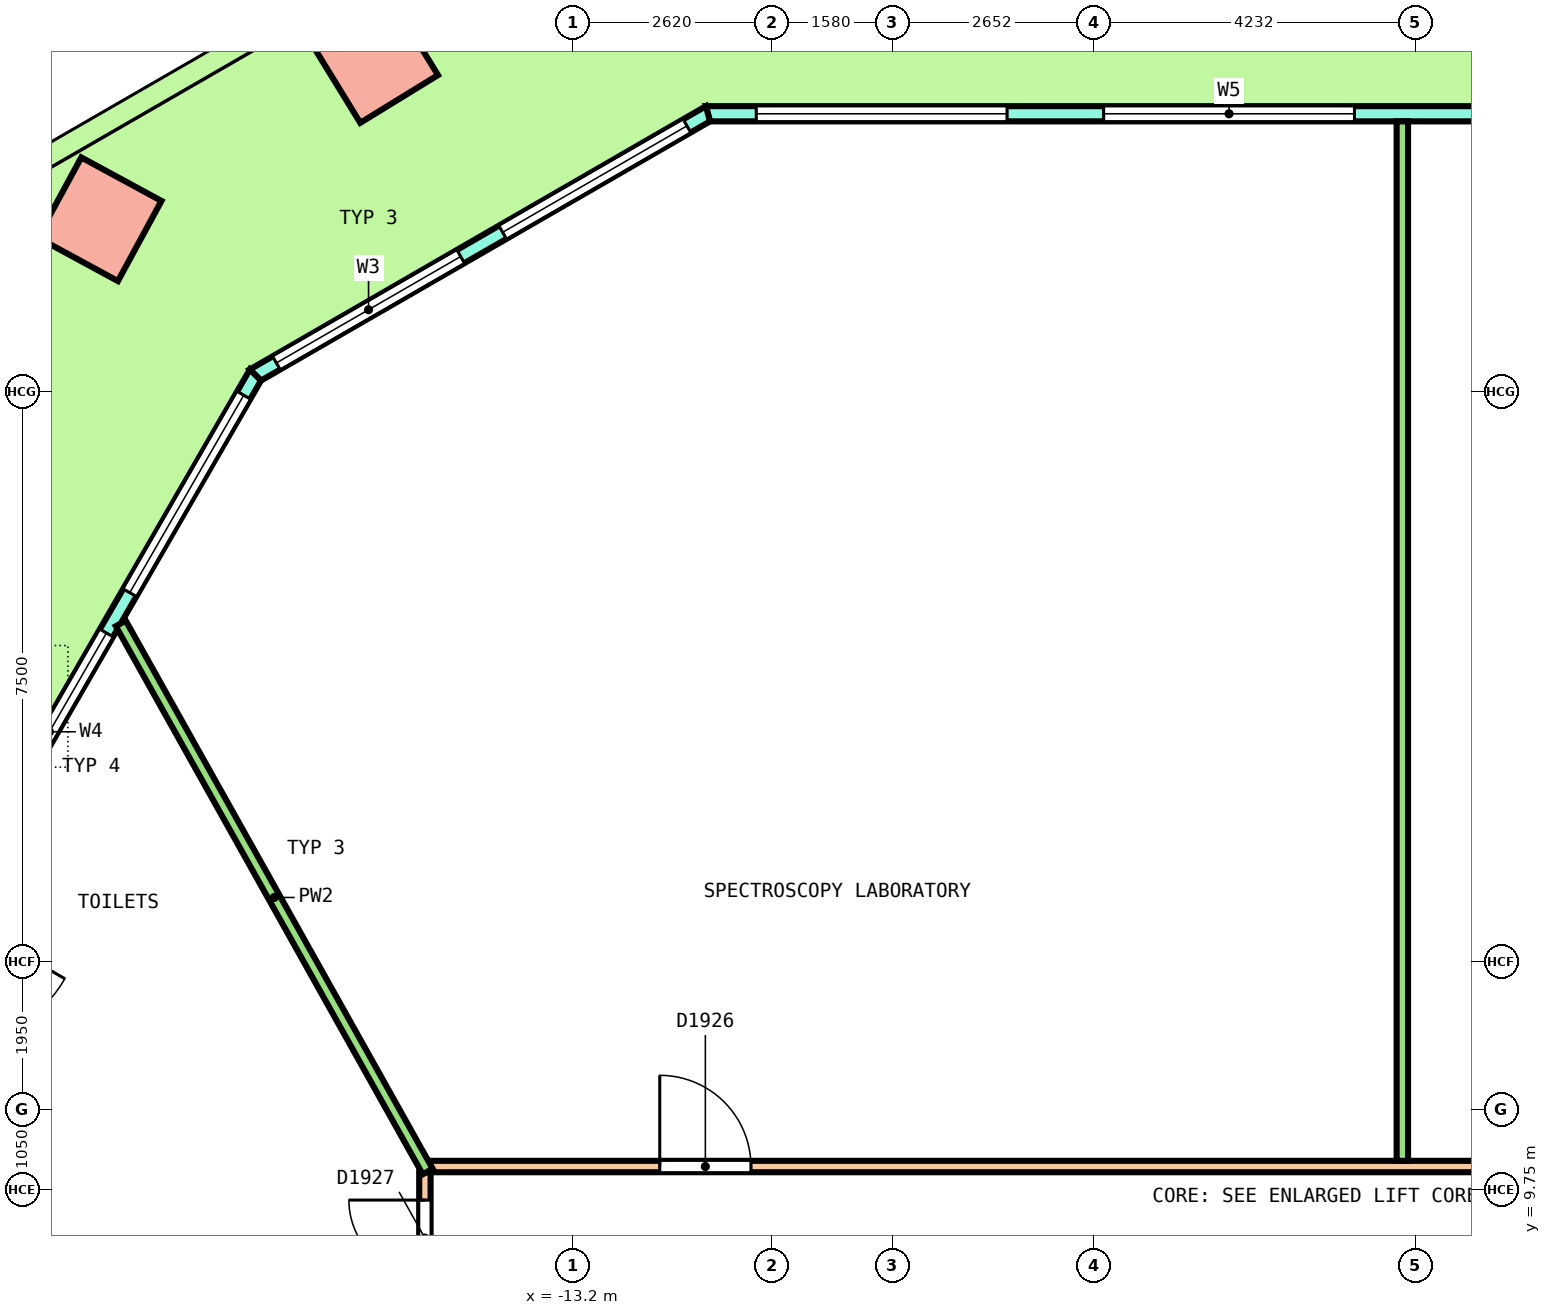
"""IFC4 building model, lengths in metres.
Left out: names, types, materials, properties, quantities, classifications, styles, units other than length and angle.
Written with IfcOpenShell. Run it as: python <this file> out.ifc"""

import sys

from ifc_helpers import new_model, si_unit, direction, frame, frame_2d, origin, origin_2d, place, context, subcontext, project, spatial, polyline, rectangle, outline, extrude, element, fill, save


model = new_model("IFC4")
c1 = context("Model", 3, precision=1e-05, world=origin(), true_north=direction((0.0, 1.0)))
c2 = subcontext(c1, "Body", "Model", "MODEL_VIEW")
j1 = project(units=[si_unit("LENGTHUNIT", "METRE"), si_unit("PLANEANGLEUNIT", "RADIAN")], contexts=[c1])
p1 = place(None, origin())
s1 = spatial("IfcSite", under=j1, at=p1, CompositionType="ELEMENT")
p2 = place(p1, origin())
s2 = spatial("IfcBuilding", under=s1, at=p2, CompositionType="ELEMENT")
p3 = place(p2, frame((0.0, 0.0, 198.0)))
s3 = spatial("IfcBuildingStorey", under=s2, at=p3, CompositionType="ELEMENT", Elevation=198.0)
for number, where, z_axis, x_axis in (
    (1, (-15.803, 24.606, 0.0), (0.341, 0.0, 0.94), (-0.801, -0.523, 0.291)),
    (2, (-19.43, 22.512, 0.0), (0.341, 0.0, 0.94), (-0.448, -0.879, 0.163)),
):
    element("IfcColumn", number, at=place(p3, frame(where, z_axis=z_axis, x_axis=x_axis)), inside=s3, PredefinedType="COLUMN", context=c2, shape_type="SweptSolid", body=[
        extrude(rectangle(XDim=1.2, YDim=1.2, at=origin_2d()), origin(), (0.0, 0.0, 1.0), 4.298),
    ])
p4 = place(p3, frame((-21.386, 19.124, 0.0), z_axis=(0.309910068217, -0.059659690135, 0.948892233602), x_axis=(-0.470578368631, -0.876836033094, 0.09856251846)))
e3 = element("IfcColumn", 3, at=p4, inside=s3, PredefinedType="COLUMN", context=c2, shape_type="SweptSolid", body=[
    extrude(rectangle(XDim=1.2, YDim=1.2, at=origin_2d()), origin(), (0.0, 0.0, 1.0), 4.268),
])
p5 = place(p3, frame((11.426, 23.9, 0.0), z_axis=(0.0, 0.0, 1.0), x_axis=(-1.0, 0.0, 0.0)))
e4 = element("IfcWall", 4, at=p5, inside=s3, PredefinedType="SOLIDWALL", context=c2, shape_type="SweptSolid", body=[
    extrude(outline(polyline([(-0.027, -0.1), (1.014, -0.1), (2.055, -0.1), (3.097, -0.1), (4.138, -0.1), (5.179, -0.1), (6.22, -0.1), (7.261, -0.1), (8.303, -0.1), (9.344, -0.1), (10.385, -0.1), (11.426, -0.1), (12.468, -0.1), (13.509, -0.1), (14.55, -0.1), (15.591, -0.1), (16.632, -0.1), (17.673, -0.1), (18.715, -0.1), (19.756, -0.1), (20.797, -0.1), (21.838, -0.1), (22.879, -0.1), (22.826, 0.1), (21.789, 0.1), (20.753, 0.1), (19.717, 0.1), (18.68, 0.1), (17.644, 0.1), (16.608, 0.1), (15.572, 0.1), (14.535, 0.1), (13.499, 0.1), (12.463, 0.1), (11.426, 0.1), (10.39, 0.1), (9.354, 0.1), (8.317, 0.1), (7.281, 0.1), (6.245, 0.1), (5.208, 0.1), (4.172, 0.1), (3.136, 0.1), (2.099, 0.1), (1.063, 0.1), (0.027, 0.1), (-0.027, -0.1)])), origin(), (0.0, 0.0, 1.0), 4.1),
])
p6 = place(p5, frame((0.635, 0.0, 0.1)))
e5 = element("IfcOpeningElement", 5, at=p6, cuts=e4, PredefinedType="OPENING", context=c2, shape_type="SweptSolid", body=[
    extrude(rectangle(XDim=3.3, YDim=2.9, at=frame_2d((1.65, 1.45))), frame((0.0, 0.11, 0.0), z_axis=(0.0, -1.0, 0.0), x_axis=(1.0, 0.0, 0.0)), (0.0, 0.0, 1.0), 0.22),
])
p7 = place(p5, frame((5.206, 0.0, 0.1)))
e6 = element("IfcOpeningElement", 6, at=p7, cuts=e4, PredefinedType="OPENING", context=c2, shape_type="SweptSolid", body=[
    extrude(rectangle(XDim=3.3, YDim=2.9, at=frame_2d((1.65, 1.45))), frame((0.0, 0.11, 0.0), z_axis=(0.0, -1.0, 0.0), x_axis=(1.0, 0.0, 0.0)), (0.0, 0.0, 1.0), 0.22),
])
p8 = place(p5, frame((10.526, 0.0, 0.0)))
e7 = element("IfcOpeningElement", 7, at=p8, cuts=e4, PredefinedType="OPENING", context=c2, shape_type="SweptSolid", body=[
    extrude(rectangle(XDim=1.8, YDim=2.4, at=frame_2d((0.9, 1.2))), frame((0.0, 0.11, 0.0), z_axis=(0.0, -1.0, 0.0), x_axis=(1.0, 0.0, 0.0)), (0.0, 0.0, 1.0), 0.22),
])
p9 = place(p5, frame((10.526, 0.0, 2.55)))
e8 = element("IfcOpeningElement", 8, at=p9, cuts=e4, PredefinedType="OPENING", context=c2, shape_type="SweptSolid", body=[
    extrude(rectangle(XDim=1.8, YDim=0.45, at=frame_2d((0.9, 0.225))), frame((0.0, 0.11, 0.0), z_axis=(0.0, -1.0, 0.0), x_axis=(1.0, 0.0, 0.0)), (0.0, 0.0, 1.0), 0.22),
])
p10 = place(p5, frame((14.347, 0.0, 0.1)))
e9 = element("IfcOpeningElement", 9, at=p10, cuts=e4, PredefinedType="OPENING", context=c2, shape_type="SweptSolid", body=[
    extrude(rectangle(XDim=3.3, YDim=2.9, at=frame_2d((1.65, 1.45))), frame((0.0, 0.11, 0.0), z_axis=(0.0, -1.0, 0.0), x_axis=(1.0, 0.0, 0.0)), (0.0, 0.0, 1.0), 0.22),
])
p11 = place(p5, frame((18.917, 0.0, 0.1)))
e10 = element("IfcOpeningElement", 10, at=p11, cuts=e4, PredefinedType="OPENING", context=c2, shape_type="SweptSolid", body=[
    extrude(rectangle(XDim=3.3, YDim=2.9, at=frame_2d((1.65, 1.45))), frame((0.0, 0.11, 0.0), z_axis=(0.0, -1.0, 0.0), x_axis=(1.0, 0.0, 0.0)), (0.0, 0.0, 1.0), 0.22),
])
p12 = place(p3, frame((-11.426, 23.9, 0.0), z_axis=(0.0, 0.0, 1.0), x_axis=(-0.866029458321, -0.49999297727, 0.0)))
e11 = element("IfcWall", 11, at=p12, inside=s3, PredefinedType="SOLIDWALL", context=c2, shape_type="SweptSolid", body=[
    extrude(outline(polyline([(-0.027, -0.1), (1.128, -0.1), (2.282, -0.1), (3.437, -0.1), (4.592, -0.1), (5.747, -0.1), (6.901, -0.1), (6.848, 0.1), (5.711, 0.1), (4.574, 0.1), (3.437, 0.1), (2.301, 0.1), (1.164, 0.1), (0.027, 0.1), (-0.027, -0.1)])), origin(), (0.0, 0.0, 1.0), 4.1),
])
p13 = place(p12, frame((0.319, 0.0, 0.1)))
e12 = element("IfcOpeningElement", 12, at=p13, cuts=e11, PredefinedType="OPENING", context=c2, shape_type="SweptSolid", body=[
    extrude(rectangle(XDim=2.8, YDim=2.9, at=frame_2d((1.4, 1.45))), frame((0.0, 0.11, 0.0), z_axis=(0.0, -1.0, 0.0), x_axis=(1.0, 0.0, 0.0)), (0.0, 0.0, 1.0), 0.22),
])
p14 = place(p12, frame((3.756, 0.0, 0.1)))
e13 = element("IfcOpeningElement", 13, at=p14, cuts=e11, PredefinedType="OPENING", context=c2, shape_type="SweptSolid", body=[
    extrude(rectangle(XDim=2.8, YDim=2.9, at=frame_2d((1.4, 1.45))), frame((0.0, 0.11, 0.0), z_axis=(0.0, -1.0, 0.0), x_axis=(1.0, 0.0, 0.0)), (0.0, 0.0, 1.0), 0.22),
])
p15 = place(p3, frame((-17.38, 20.463, 0.0), z_axis=(0.0, 0.0, 1.0), x_axis=(-0.500000137386, -0.866025324465, 0.0)))
e14 = element("IfcWall", 14, at=p15, inside=s3, PredefinedType="SOLIDWALL", context=c2, shape_type="SweptSolid", body=[
    extrude(outline(polyline([(-0.027, -0.1), (0.979, -0.1), (1.986, -0.1), (2.992, -0.1), (3.999, -0.1), (5.005, -0.1), (6.012, -0.1), (7.018, -0.1), (8.025, -0.1), (9.031, -0.1), (10.038, -0.1), (11.044, -0.1), (12.051, -0.1), (13.057, -0.1), (14.063, -0.1), (15.07, -0.1), (16.076, -0.1), (17.083, -0.1), (18.089, -0.1), (18.036, 0.1), (17.035, 0.1), (16.035, 0.1), (15.034, 0.1), (14.034, 0.1), (13.033, 0.1), (12.033, 0.1), (11.032, 0.1), (10.032, 0.1), (9.031, 0.1), (8.031, 0.1), (7.03, 0.1), (6.03, 0.1), (5.029, 0.1), (4.029, 0.1), (3.028, 0.1), (2.028, 0.1), (1.027, 0.1), (0.027, 0.1), (-0.027, -0.1)])), origin(), (0.0, 0.0, 1.0), 4.1),
])
p16 = place(p15, frame((0.306, 0.0, 0.1)))
e15 = element("IfcOpeningElement", 15, at=p16, cuts=e14, PredefinedType="OPENING", context=c2, shape_type="SweptSolid", body=[
    extrude(rectangle(XDim=3.0, YDim=2.9, at=frame_2d((1.5, 1.45))), frame((0.0, 0.11, 0.0), z_axis=(0.0, -1.0, 0.0), x_axis=(1.0, 0.0, 0.0)), (0.0, 0.0, 1.0), 0.22),
])
p17 = place(p15, frame((3.919, 0.0, 0.1)))
e16 = element("IfcOpeningElement", 16, at=p17, cuts=e14, PredefinedType="OPENING", context=c2, shape_type="SweptSolid", body=[
    extrude(rectangle(XDim=3.0, YDim=2.9, at=frame_2d((1.5, 1.45))), frame((0.0, 0.11, 0.0), z_axis=(0.0, -1.0, 0.0), x_axis=(1.0, 0.0, 0.0)), (0.0, 0.0, 1.0), 0.22),
])
p18 = place(p15, frame((8.131, 0.0, 0.0)))
e17 = element("IfcOpeningElement", 17, at=p18, cuts=e14, PredefinedType="OPENING", context=c2, shape_type="SweptSolid", body=[
    extrude(rectangle(XDim=1.8, YDim=2.4, at=frame_2d((0.9, 1.2))), frame((0.0, 0.11, 0.0), z_axis=(0.0, -1.0, 0.0), x_axis=(1.0, 0.0, 0.0)), (0.0, 0.0, 1.0), 0.22),
])
p19 = place(p15, frame((8.131, 0.0, 2.55)))
e18 = element("IfcOpeningElement", 18, at=p19, cuts=e14, PredefinedType="OPENING", context=c2, shape_type="SweptSolid", body=[
    extrude(rectangle(XDim=1.8, YDim=0.45, at=frame_2d((0.9, 0.225))), frame((0.0, 0.11, 0.0), z_axis=(0.0, -1.0, 0.0), x_axis=(1.0, 0.0, 0.0)), (0.0, 0.0, 1.0), 0.22),
])
p20 = place(p15, frame((11.144, 0.0, 0.1)))
e19 = element("IfcOpeningElement", 19, at=p20, cuts=e14, PredefinedType="OPENING", context=c2, shape_type="SweptSolid", body=[
    extrude(rectangle(XDim=3.0, YDim=2.9, at=frame_2d((1.5, 1.45))), frame((0.0, 0.11, 0.0), z_axis=(0.0, -1.0, 0.0), x_axis=(1.0, 0.0, 0.0)), (0.0, 0.0, 1.0), 0.22),
])
p21 = place(p15, frame((14.756, 0.0, 0.1)))
e20 = element("IfcOpeningElement", 20, at=p21, cuts=e14, PredefinedType="OPENING", context=c2, shape_type="SweptSolid", body=[
    extrude(rectangle(XDim=3.0, YDim=2.9, at=frame_2d((1.5, 1.45))), frame((0.0, 0.11, 0.0), z_axis=(0.0, -1.0, 0.0), x_axis=(1.0, 0.0, 0.0)), (0.0, 0.0, 1.0), 0.22),
])
p22 = place(p3, frame((-15.075, 10.05, 0.0), z_axis=(0.0, 0.0, 1.0), x_axis=(1.0, 0.0, 0.0)))
e21 = element("IfcWall", 21, at=p22, inside=s3, PredefinedType="PARTITIONING", context=c2, shape_type="SweptSolid", body=[
    extrude(rectangle(XDim=30.15, YDim=0.15, at=frame_2d((15.075, 0.0))), origin(), (0.0, 0.0, 1.0), 3.05),
])
p23 = place(p22, frame((28.226, 0.0, 0.0)))
e22 = element("IfcOpeningElement", 22, at=p23, cuts=e21, PredefinedType="OPENING", context=c2, shape_type="SweptSolid", body=[
    extrude(rectangle(XDim=1.2, YDim=2.1, at=frame_2d((0.6, 1.05))), frame((0.0, 0.085, 0.0), z_axis=(0.0, -1.0, 0.0), x_axis=(1.0, 0.0, 0.0)), (0.0, 0.0, 1.0), 0.17),
])
p24 = place(p22, frame((17.28, 0.0, 0.0)))
e23 = element("IfcOpeningElement", 23, at=p24, cuts=e21, PredefinedType="OPENING", context=c2, shape_type="SweptSolid", body=[
    extrude(rectangle(XDim=1.2, YDim=2.1, at=frame_2d((0.6, 1.05))), frame((0.0, 0.085, 0.0), z_axis=(0.0, -1.0, 0.0), x_axis=(1.0, 0.0, 0.0)), (0.0, 0.0, 1.0), 0.17),
])
p25 = place(p22, frame((3.015, 0.0, 0.0)))
e24 = element("IfcOpeningElement", 24, at=p25, cuts=e21, PredefinedType="OPENING", context=c2, shape_type="SweptSolid", body=[
    extrude(rectangle(XDim=1.2, YDim=2.1, at=frame_2d((0.6, 1.05))), frame((0.0, 0.085, 0.0), z_axis=(0.0, -1.0, 0.0), x_axis=(1.0, 0.0, 0.0)), (0.0, 0.0, 1.0), 0.17),
])
p26 = place(p3, frame((-15.15, 0.576, 0.0), z_axis=(0.0, 0.0, 1.0), x_axis=(0.0, 1.0, 0.0)))
e25 = element("IfcWall", 25, at=p26, inside=s3, PredefinedType="PARTITIONING", context=c2, shape_type="SweptSolid", body=[
    extrude(rectangle(XDim=9.399, YDim=0.15, at=frame_2d((4.7, 0.0))), origin(), (0.0, 0.0, 1.0), 3.05),
])
p27 = place(p26, frame((8.033, 0.0, 0.0)))
e26 = element("IfcOpeningElement", 26, at=p27, cuts=e25, PredefinedType="OPENING", context=c2, shape_type="SweptSolid", body=[
    extrude(rectangle(XDim=1.0, YDim=2.1, at=frame_2d((0.5, 1.05))), frame((0.0, 0.085, 0.0), z_axis=(0.0, -1.0, 0.0), x_axis=(1.0, 0.0, 0.0)), (0.0, 0.0, 1.0), 0.17),
])
p28 = place(p3, frame((-2.291, 10.125, 0.0), z_axis=(0.0, 0.0, 1.0), x_axis=(0.0, 1.0, 0.0)))
e27 = element("IfcWall", 27, at=p28, inside=s3, PredefinedType="PARTITIONING", context=c2, shape_type="SweptSolid", body=[
    extrude(rectangle(XDim=13.675, YDim=0.15, at=frame_2d((6.837, 0.0))), origin(), (0.0, 0.0, 1.0), 3.05),
])
p29 = place(p3, frame((-19.151, 17.195, 0.0), z_axis=(0.0, 0.0, 1.0), x_axis=(0.488579979152, -0.872519113815, 0.0)))
e28 = element("IfcWall", 28, at=p29, inside=s3, PredefinedType="PARTITIONING", context=c2, shape_type="SweptSolid", body=[
    extrude(rectangle(XDim=8.264, YDim=0.15, at=frame_2d((4.132, 0.0))), origin(), (0.0, 0.0, 1.0), 3.05),
])
p30 = place(p10, origin())
e29 = element("IfcWindow", 29, at=p30, inside=s3, PartitioningType="SINGLE_PANEL", PredefinedType="WINDOW", context=c2, shape_type="SweptSolid", body=[
    extrude(rectangle(XDim=3.3, YDim=2.9, at=frame_2d((1.65, 1.45))), frame((0.0, 0.03, 0.0), z_axis=(0.0, -1.0, 0.0), x_axis=(1.0, 0.0, 0.0)), (0.0, 0.0, 1.0), 0.06),
])
fill(e9, e29)
p31 = place(p11, origin())
e30 = element("IfcWindow", 30, at=p31, inside=s3, PartitioningType="SINGLE_PANEL", PredefinedType="WINDOW", context=c2, shape_type="SweptSolid", body=[
    extrude(rectangle(XDim=3.3, YDim=2.9, at=frame_2d((1.65, 1.45))), frame((0.0, 0.03, 0.0), z_axis=(0.0, -1.0, 0.0), x_axis=(1.0, 0.0, 0.0)), (0.0, 0.0, 1.0), 0.06),
])
fill(e10, e30)
p32 = place(p13, origin())
e31 = element("IfcWindow", 31, at=p32, inside=s3, PartitioningType="SINGLE_PANEL", PredefinedType="WINDOW", context=c2, shape_type="SweptSolid", body=[
    extrude(rectangle(XDim=2.8, YDim=2.9, at=frame_2d((1.4, 1.45))), frame((0.0, 0.03, 0.0), z_axis=(0.0, -1.0, 0.0), x_axis=(1.0, 0.0, 0.0)), (0.0, 0.0, 1.0), 0.06),
])
fill(e12, e31)
p33 = place(p14, origin())
e32 = element("IfcWindow", 32, at=p33, inside=s3, PartitioningType="SINGLE_PANEL", PredefinedType="WINDOW", context=c2, shape_type="SweptSolid", body=[
    extrude(rectangle(XDim=2.8, YDim=2.9, at=frame_2d((1.4, 1.45))), frame((0.0, 0.03, 0.0), z_axis=(0.0, -1.0, 0.0), x_axis=(1.0, 0.0, 0.0)), (0.0, 0.0, 1.0), 0.06),
])
fill(e13, e32)
p34 = place(p16, origin())
e33 = element("IfcWindow", 33, at=p34, inside=s3, PartitioningType="SINGLE_PANEL", PredefinedType="WINDOW", context=c2, shape_type="SweptSolid", body=[
    extrude(rectangle(XDim=3.0, YDim=2.9, at=frame_2d((1.5, 1.45))), frame((0.0, 0.03, 0.0), z_axis=(0.0, -1.0, 0.0), x_axis=(1.0, 0.0, 0.0)), (0.0, 0.0, 1.0), 0.06),
])
fill(e15, e33)
p35 = place(p17, origin())
e34 = element("IfcWindow", 34, at=p35, inside=s3, PartitioningType="SINGLE_PANEL", PredefinedType="WINDOW", context=c2, shape_type="SweptSolid", body=[
    extrude(rectangle(XDim=3.0, YDim=2.9, at=frame_2d((1.5, 1.45))), frame((0.0, 0.03, 0.0), z_axis=(0.0, -1.0, 0.0), x_axis=(1.0, 0.0, 0.0)), (0.0, 0.0, 1.0), 0.06),
])
fill(e16, e34)
p36 = place(p25, origin())
e35 = element("IfcDoor", 35, at=p36, inside=s3, OperationType="DOUBLE_DOOR_SINGLE_SWING", PredefinedType="DOOR", context=c2, shape_type="SweptSolid", body=[
    extrude(rectangle(XDim=1.2, YDim=2.1, at=frame_2d((0.6, 1.05))), frame((0.0, 0.025, 0.0), z_axis=(0.0, -1.0, 0.0), x_axis=(1.0, 0.0, 0.0)), (0.0, 0.0, 1.0), 0.05),
])
fill(e24, e35)
p37 = place(p27, origin())
e36 = element("IfcDoor", 36, at=p37, inside=s3, OperationType="SINGLE_SWING_LEFT", PredefinedType="DOOR", context=c2, shape_type="SweptSolid", body=[
    extrude(rectangle(XDim=1.0, YDim=2.1, at=frame_2d((0.5, 1.05))), frame((0.0, 0.025, 0.0), z_axis=(0.0, -1.0, 0.0), x_axis=(1.0, 0.0, 0.0)), (0.0, 0.0, 1.0), 0.05),
])
fill(e26, e36)
save(model, sys.argv[1])
